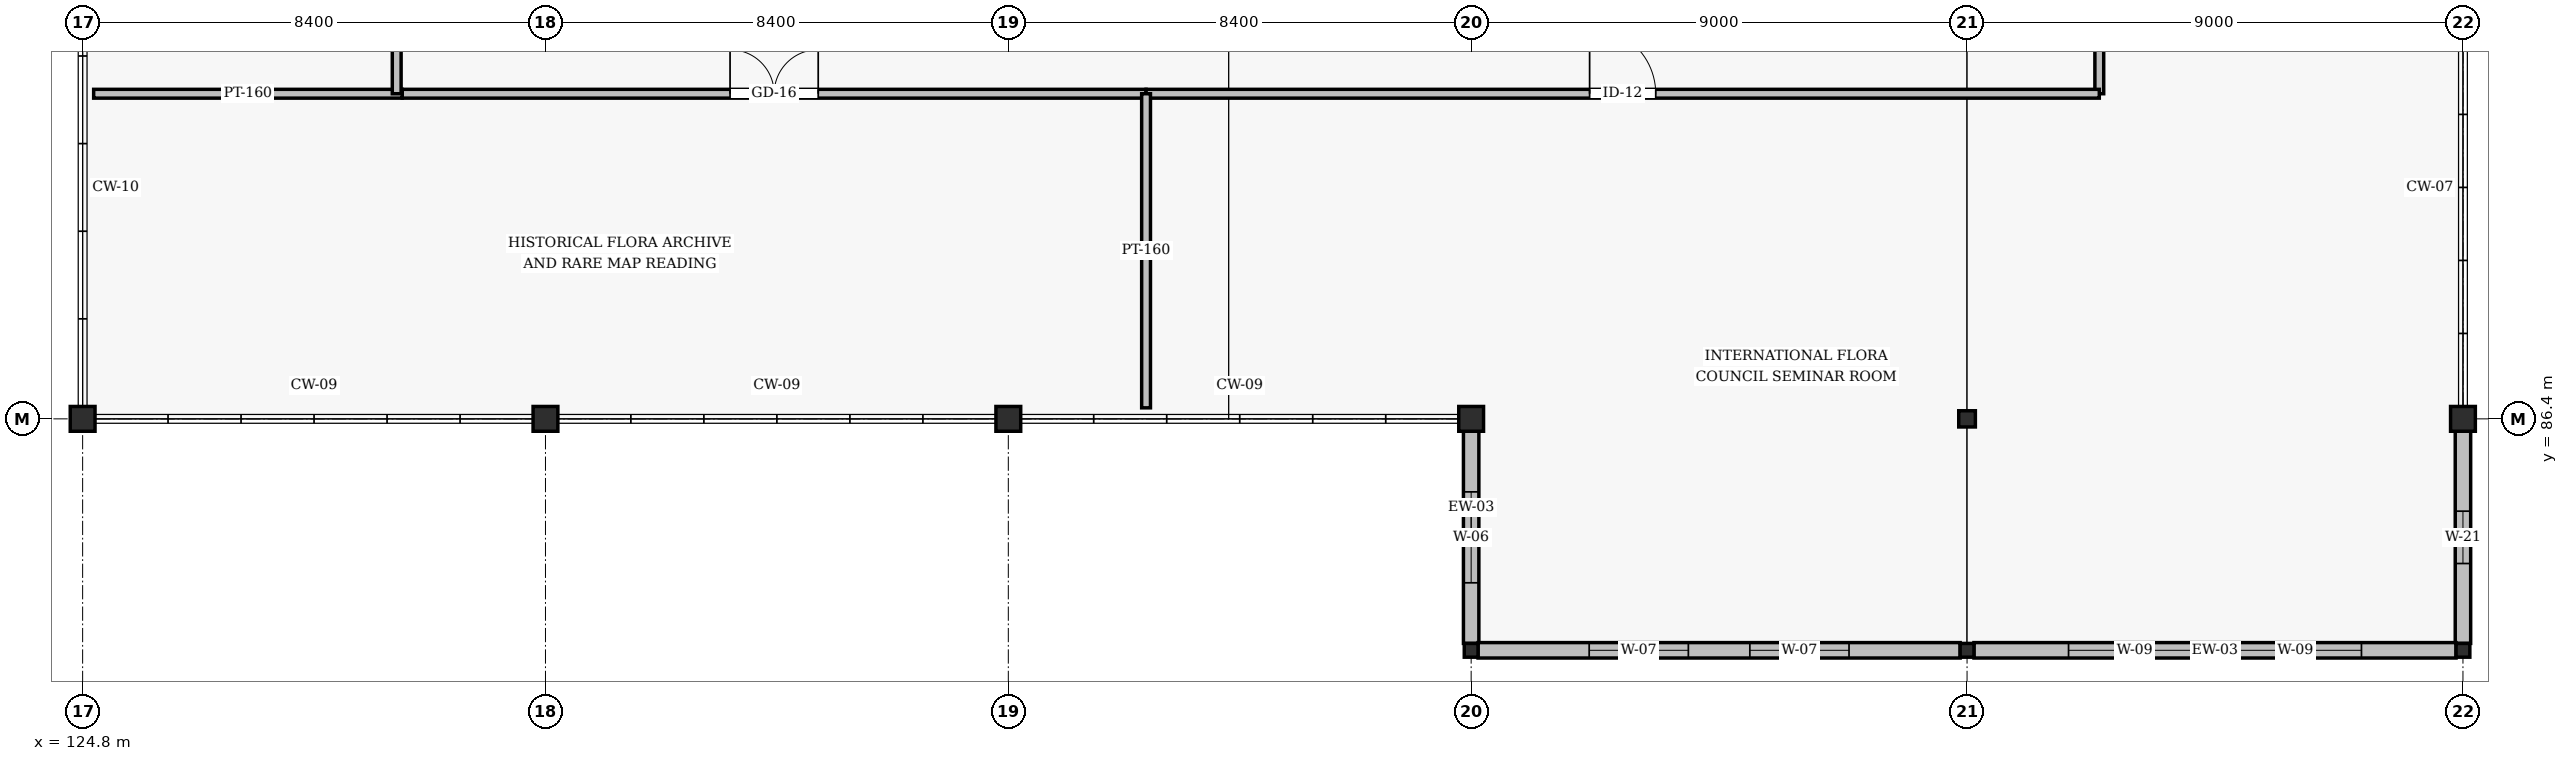
"""IFC4 building model, lengths in metres.
Left out: names, types, materials, properties, quantities, classifications, styles, units other than length and angle.
Written with IfcOpenShell. Run it as: python <this file> out.ifc"""

import sys

from ifc_helpers import new_model, si_unit, direction, frame, frame_2d, origin, origin_2d, place, context, subcontext, project, spatial, rectangle, hollow_rectangle, i_section, extrude, element, fill, save


model = new_model("IFC4")
c1 = context("Model", 3, precision=1e-05, world=origin(), true_north=direction((0.0, 1.0)))
c2 = subcontext(c1, "Body", "Model", "MODEL_VIEW")
j1 = project(units=[si_unit("LENGTHUNIT", "METRE"), si_unit("PLANEANGLEUNIT", "RADIAN")], contexts=[c1])
p1 = place(None, origin())
s1 = spatial("IfcSite", under=j1, at=p1, CompositionType="ELEMENT")
p2 = place(p1, origin())
s2 = spatial("IfcBuilding", under=s1, at=p2, CompositionType="ELEMENT")
p3 = place(p2, frame((0.0, 0.0, 46.8)))
s3 = spatial("IfcBuildingStorey", under=s2, at=p3, CompositionType="ELEMENT", Elevation=46.8)
p4 = place(p3, frame((124.8, 86.4, 0.0), z_axis=(0.0, 0.0, 1.0), x_axis=(1.0, 0.0, 0.0)))
e1 = element("IfcColumn", 1, at=p4, inside=s3, PredefinedType="COLUMN", context=c2, shape_type="SweptSolid", body=[
    extrude(hollow_rectangle(XDim=0.45, YDim=0.45, WallThickness=0.018, InnerFilletRadius=0.018, OuterFilletRadius=0.036, at=origin_2d()), origin(), (0.0, 0.0, 1.0), 3.576),
])
for number, where, z_axis, x_axis in (
    (2, (133.2, 86.4, 0.0), (0.0, 0.0, 1.0), (1.0, 0.0, 0.0)),
    (3, (141.6, 86.4, 0.0), (0.0, 0.0, 1.0), (1.0, 0.0, 0.0)),
):
    element("IfcColumn", number, at=place(p3, frame(where, z_axis=z_axis, x_axis=x_axis)), inside=s3, PredefinedType="COLUMN", context=c2, shape_type="SweptSolid", body=[
        extrude(hollow_rectangle(XDim=0.45, YDim=0.45, WallThickness=0.018, InnerFilletRadius=0.018, OuterFilletRadius=0.036, at=origin_2d()), origin(), (0.0, 0.0, 1.0), 3.6),
    ])
p5 = place(p3, frame((150.0, 82.2, 0.0), z_axis=(0.0, 0.0, 1.0), x_axis=(1.0, 0.0, 0.0)))
e4 = element("IfcColumn", 4, at=p5, inside=s3, PredefinedType="COLUMN", context=c2, shape_type="SweptSolid", body=[
    extrude(i_section(OverallWidth=0.25, OverallDepth=0.25, WebThickness=0.009, FlangeThickness=0.014, FilletRadius=0.016, at=origin_2d()), origin(), (0.0, 0.0, 1.0), 3.6),
])
p6 = place(p3, frame((150.0, 86.4, 0.0), z_axis=(0.0, 0.0, 1.0), x_axis=(1.0, 0.0, 0.0)))
e5 = element("IfcColumn", 5, at=p6, inside=s3, PredefinedType="COLUMN", context=c2, shape_type="SweptSolid", body=[
    extrude(hollow_rectangle(XDim=0.45, YDim=0.45, WallThickness=0.018, InnerFilletRadius=0.018, OuterFilletRadius=0.036, at=origin_2d()), origin(), (0.0, 0.0, 1.0), 3.6),
])
p7 = place(p3, frame((159.0, 82.2, 0.0), z_axis=(0.0, 0.0, 1.0), x_axis=(1.0, 0.0, 0.0)))
e6 = element("IfcColumn", 6, at=p7, inside=s3, PredefinedType="COLUMN", context=c2, shape_type="SweptSolid", body=[
    extrude(i_section(OverallWidth=0.25, OverallDepth=0.25, WebThickness=0.009, FlangeThickness=0.014, FilletRadius=0.016, at=origin_2d()), origin(), (0.0, 0.0, 1.0), 3.6),
])
p8 = place(p3, frame((159.0, 86.4, 0.0), z_axis=(0.0, 0.0, 1.0), x_axis=(1.0, 0.0, 0.0)))
e7 = element("IfcColumn", 7, at=p8, inside=s3, PredefinedType="COLUMN", context=c2, shape_type="SweptSolid", body=[
    extrude(i_section(OverallWidth=0.302, OverallDepth=0.294, WebThickness=0.012, FlangeThickness=0.012, FilletRadius=0.018, at=origin_2d()), origin(), (0.0, 0.0, 1.0), 3.6),
])
p9 = place(p3, frame((168.0, 82.2, 0.0), z_axis=(0.0, 0.0, 1.0), x_axis=(1.0, 0.0, 0.0)))
e8 = element("IfcColumn", 8, at=p9, inside=s3, PredefinedType="COLUMN", context=c2, shape_type="SweptSolid", body=[
    extrude(i_section(OverallWidth=0.25, OverallDepth=0.25, WebThickness=0.009, FlangeThickness=0.014, FilletRadius=0.016, at=origin_2d()), origin(), (0.0, 0.0, 1.0), 3.6),
])
p10 = place(p3, frame((168.0, 86.4, 0.0), z_axis=(0.0, 0.0, 1.0), x_axis=(1.0, 0.0, 0.0)))
e9 = element("IfcColumn", 9, at=p10, inside=s3, PredefinedType="COLUMN", context=c2, shape_type="SweptSolid", body=[
    extrude(hollow_rectangle(XDim=0.45, YDim=0.45, WallThickness=0.018, InnerFilletRadius=0.018, OuterFilletRadius=0.036, at=origin_2d()), origin(), (0.0, 0.0, 1.0), 3.6),
])
p11 = place(p3, frame((168.0, 82.325, 0.0), z_axis=(0.0, 0.0, 1.0), x_axis=(0.0, 1.0, 0.0)))
e10 = element("IfcWall", 10, at=p11, inside=s3, PredefinedType="SOLIDWALL", context=c2, shape_type="SweptSolid", body=[
    extrude(rectangle(XDim=3.85, YDim=0.28, at=frame_2d((1.925, 0.0))), origin(), (0.0, 0.0, 1.0), 3.338),
])
p12 = place(p11, frame((1.45, 0.0, 0.95)))
e11 = element("IfcOpeningElement", 11, at=p12, cuts=e10, PredefinedType="OPENING", context=c2, shape_type="SweptSolid", body=[
    extrude(rectangle(XDim=0.95, YDim=1.75, at=frame_2d((0.475, 0.875))), frame((0.0, 0.15, 0.0), z_axis=(0.0, -1.0, 0.0), x_axis=(1.0, 0.0, 0.0)), (0.0, 0.0, 1.0), 0.3),
])
p13 = place(p3, frame((150.0, 86.175, 0.0), z_axis=(0.0, 0.0, 1.0), x_axis=(0.0, -1.0, 0.0)))
e12 = element("IfcWall", 12, at=p13, inside=s3, PredefinedType="SOLIDWALL", context=c2, shape_type="SweptSolid", body=[
    extrude(rectangle(XDim=3.85, YDim=0.28, at=frame_2d((1.925, 0.0))), origin(), (0.0, 0.0, 1.0), 3.338),
])
p14 = place(p13, frame((1.1, 0.0, 0.85)))
e13 = element("IfcOpeningElement", 13, at=p14, cuts=e12, PredefinedType="OPENING", context=c2, shape_type="SweptSolid", body=[
    extrude(rectangle(XDim=1.65, YDim=2.1, at=frame_2d((0.825, 1.05))), frame((0.0, 0.15, 0.0), z_axis=(0.0, -1.0, 0.0), x_axis=(1.0, 0.0, 0.0)), (0.0, 0.0, 1.0), 0.3),
])
p15 = place(p3, frame((150.125, 82.2, 0.0), z_axis=(0.0, 0.0, 1.0), x_axis=(1.0, 0.0, 0.0)))
e14 = element("IfcWall", 14, at=p15, inside=s3, PredefinedType="SOLIDWALL", context=c2, shape_type="SweptSolid", body=[
    extrude(rectangle(XDim=8.75, YDim=0.28, at=frame_2d((4.375, 0.0))), origin(), (0.0, 0.0, 1.0), 3.338),
])
p16 = place(p15, frame((2.017, 0.0, 0.85)))
e15 = element("IfcOpeningElement", 15, at=p16, cuts=e14, PredefinedType="OPENING", context=c2, shape_type="SweptSolid", body=[
    extrude(rectangle(XDim=1.8, YDim=2.1, at=frame_2d((0.9, 1.05))), frame((0.0, 0.15, 0.0), z_axis=(0.0, -1.0, 0.0), x_axis=(1.0, 0.0, 0.0)), (0.0, 0.0, 1.0), 0.3),
])
p17 = place(p15, frame((4.933, 0.0, 0.85)))
e16 = element("IfcOpeningElement", 16, at=p17, cuts=e14, PredefinedType="OPENING", context=c2, shape_type="SweptSolid", body=[
    extrude(rectangle(XDim=1.8, YDim=2.1, at=frame_2d((0.9, 1.05))), frame((0.0, 0.15, 0.0), z_axis=(0.0, -1.0, 0.0), x_axis=(1.0, 0.0, 0.0)), (0.0, 0.0, 1.0), 0.3),
])
p18 = place(p3, frame((159.125, 82.2, 0.0), z_axis=(0.0, 0.0, 1.0), x_axis=(1.0, 0.0, 0.0)))
e17 = element("IfcWall", 17, at=p18, inside=s3, PredefinedType="SOLIDWALL", context=c2, shape_type="SweptSolid", body=[
    extrude(rectangle(XDim=8.75, YDim=0.28, at=frame_2d((4.375, 0.0))), origin(), (0.0, 0.0, 1.0), 3.338),
])
p19 = place(p18, frame((1.717, 0.0, 0.85)))
e18 = element("IfcOpeningElement", 18, at=p19, cuts=e17, PredefinedType="OPENING", context=c2, shape_type="SweptSolid", body=[
    extrude(rectangle(XDim=2.4, YDim=2.1, at=frame_2d((1.2, 1.05))), frame((0.0, 0.15, 0.0), z_axis=(0.0, -1.0, 0.0), x_axis=(1.0, 0.0, 0.0)), (0.0, 0.0, 1.0), 0.3),
])
p20 = place(p18, frame((4.633, 0.0, 0.85)))
e19 = element("IfcOpeningElement", 19, at=p20, cuts=e17, PredefinedType="OPENING", context=c2, shape_type="SweptSolid", body=[
    extrude(rectangle(XDim=2.4, YDim=2.1, at=frame_2d((1.2, 1.05))), frame((0.0, 0.15, 0.0), z_axis=(0.0, -1.0, 0.0), x_axis=(1.0, 0.0, 0.0)), (0.0, 0.0, 1.0), 0.3),
])
p21 = place(p3, frame((161.4, 92.3, 0.0), z_axis=(0.0, 0.0, 1.0), x_axis=(0.0, 1.0, 0.0)))
e20 = element("IfcWall", 20, at=p21, inside=s3, PredefinedType="PARTITIONING", context=c2, shape_type="SweptSolid", body=[
    extrude(rectangle(XDim=14.1, YDim=0.16, at=frame_2d((7.05, 0.0))), origin(), (0.0, 0.0, 1.0), 2.742),
])
p22 = place(p21, frame((6.5, 0.0, 0.0)))
e21 = element("IfcOpeningElement", 21, at=p22, cuts=e20, PredefinedType="OPENING", context=c2, shape_type="SweptSolid", body=[
    extrude(rectangle(XDim=1.08, YDim=2.08, at=frame_2d((0.54, 1.04))), frame((0.0, 0.09, 0.0), z_axis=(0.0, -1.0, 0.0), x_axis=(1.0, 0.0, 0.0)), (0.0, 0.0, 1.0), 0.18),
])
p23 = place(p3, frame((130.6, 92.3, 0.0), z_axis=(0.0, 0.0, 1.0), x_axis=(1.0, 0.0, 0.0)))
e22 = element("IfcWall", 22, at=p23, inside=s3, PredefinedType="PARTITIONING", context=c2, shape_type="SweptSolid", body=[
    extrude(rectangle(XDim=13.5, YDim=0.16, at=frame_2d((6.75, 0.0))), origin(), (0.0, 0.0, 1.0), 2.838),
])
p24 = place(p23, frame((5.95, 0.0, 0.0)))
e23 = element("IfcOpeningElement", 23, at=p24, cuts=e22, PredefinedType="OPENING", context=c2, shape_type="SweptSolid", body=[
    extrude(rectangle(XDim=1.6, YDim=2.1, at=frame_2d((0.8, 1.05))), frame((0.0, 0.09, 0.0), z_axis=(0.0, -1.0, 0.0), x_axis=(1.0, 0.0, 0.0)), (0.0, 0.0, 1.0), 0.18),
])
p25 = place(p3, frame((144.1, 92.3, 0.0), z_axis=(0.0, 0.0, 1.0), x_axis=(1.0, 0.0, 0.0)))
e24 = element("IfcWall", 24, at=p25, inside=s3, PredefinedType="PARTITIONING", context=c2, shape_type="SweptSolid", body=[
    extrude(rectangle(XDim=17.3, YDim=0.16, at=frame_2d((8.65, 0.0))), origin(), (0.0, 0.0, 1.0), 2.838),
])
p26 = place(p25, frame((8.05, 0.0, 0.0)))
e25 = element("IfcOpeningElement", 25, at=p26, cuts=e24, PredefinedType="OPENING", context=c2, shape_type="SweptSolid", body=[
    extrude(rectangle(XDim=1.2, YDim=2.08, at=frame_2d((0.6, 1.04))), frame((0.0, 0.09, 0.0), z_axis=(0.0, -1.0, 0.0), x_axis=(1.0, 0.0, 0.0)), (0.0, 0.0, 1.0), 0.18),
])
p27 = place(p3, frame((125.0, 92.3, 0.0), z_axis=(0.0, 0.0, 1.0), x_axis=(1.0, 0.0, 0.0)))
e26 = element("IfcWall", 26, at=p27, inside=s3, PredefinedType="PARTITIONING", context=c2, shape_type="SweptSolid", body=[
    extrude(rectangle(XDim=5.6, YDim=0.16, at=frame_2d((2.8, 0.0))), origin(), (0.0, 0.0, 1.0), 3.338),
])
p28 = place(p3, frame((144.1, 86.6, 0.0), z_axis=(0.0, 0.0, 1.0), x_axis=(0.0, 1.0, 0.0)))
e27 = element("IfcWall", 27, at=p28, inside=s3, PredefinedType="PARTITIONING", context=c2, shape_type="SweptSolid", body=[
    extrude(rectangle(XDim=5.7, YDim=0.16, at=frame_2d((2.85, 0.0))), origin(), (0.0, 0.0, 1.0), 2.988),
])
p29 = place(p3, frame((130.5, 92.3, 0.0), z_axis=(0.0, 0.0, 1.0), x_axis=(0.0, 1.0, 0.0)))
e28 = element("IfcWall", 28, at=p29, inside=s3, PredefinedType="PARTITIONING", context=c2, shape_type="SweptSolid", body=[
    extrude(rectangle(XDim=14.2, YDim=0.16, at=frame_2d((7.1, 0.0))), origin(), (0.0, 0.0, 1.0), 2.838),
])
p30 = place(p29, frame((6.5, 0.0, 0.0)))
e29 = element("IfcOpeningElement", 29, at=p30, cuts=e28, PredefinedType="OPENING", context=c2, shape_type="SweptSolid", body=[
    extrude(rectangle(XDim=1.25, YDim=2.12, at=frame_2d((0.625, 1.06))), frame((0.0, 0.09, 0.0), z_axis=(0.0, -1.0, 0.0), x_axis=(1.0, 0.0, 0.0)), (0.0, 0.0, 1.0), 0.18),
])
p31 = place(p12, origin())
e30 = element("IfcWindow", 30, at=p31, inside=s3, PartitioningType="SINGLE_PANEL", PredefinedType="WINDOW", context=c2, shape_type="SweptSolid", body=[
    extrude(rectangle(XDim=0.95, YDim=1.75, at=frame_2d((0.475, 0.875))), frame((0.0, 0.03, 0.0), z_axis=(0.0, -1.0, 0.0), x_axis=(1.0, 0.0, 0.0)), (0.0, 0.0, 1.0), 0.06),
])
fill(e11, e30)
p32 = place(p14, origin())
e31 = element("IfcWindow", 31, at=p32, inside=s3, PartitioningType="SINGLE_PANEL", PredefinedType="WINDOW", context=c2, shape_type="SweptSolid", body=[
    extrude(rectangle(XDim=1.65, YDim=2.1, at=frame_2d((0.825, 1.05))), frame((0.0, 0.03, 0.0), z_axis=(0.0, -1.0, 0.0), x_axis=(1.0, 0.0, 0.0)), (0.0, 0.0, 1.0), 0.06),
])
fill(e13, e31)
p33 = place(p16, origin())
e32 = element("IfcWindow", 32, at=p33, inside=s3, PartitioningType="SINGLE_PANEL", PredefinedType="WINDOW", context=c2, shape_type="SweptSolid", body=[
    extrude(rectangle(XDim=1.8, YDim=2.1, at=frame_2d((0.9, 1.05))), frame((0.0, 0.03, 0.0), z_axis=(0.0, -1.0, 0.0), x_axis=(1.0, 0.0, 0.0)), (0.0, 0.0, 1.0), 0.06),
])
fill(e15, e32)
p34 = place(p17, origin())
e33 = element("IfcWindow", 33, at=p34, inside=s3, PartitioningType="SINGLE_PANEL", PredefinedType="WINDOW", context=c2, shape_type="SweptSolid", body=[
    extrude(rectangle(XDim=1.8, YDim=2.1, at=frame_2d((0.9, 1.05))), frame((0.0, 0.03, 0.0), z_axis=(0.0, -1.0, 0.0), x_axis=(1.0, 0.0, 0.0)), (0.0, 0.0, 1.0), 0.06),
])
fill(e16, e33)
p35 = place(p19, origin())
e34 = element("IfcWindow", 34, at=p35, inside=s3, PartitioningType="SINGLE_PANEL", PredefinedType="WINDOW", context=c2, shape_type="SweptSolid", body=[
    extrude(rectangle(XDim=2.4, YDim=2.1, at=frame_2d((1.2, 1.05))), frame((0.0, 0.03, 0.0), z_axis=(0.0, -1.0, 0.0), x_axis=(1.0, 0.0, 0.0)), (0.0, 0.0, 1.0), 0.06),
])
fill(e18, e34)
p36 = place(p20, origin())
e35 = element("IfcWindow", 35, at=p36, inside=s3, PartitioningType="SINGLE_PANEL", PredefinedType="WINDOW", context=c2, shape_type="SweptSolid", body=[
    extrude(rectangle(XDim=2.4, YDim=2.1, at=frame_2d((1.2, 1.05))), frame((0.0, 0.03, 0.0), z_axis=(0.0, -1.0, 0.0), x_axis=(1.0, 0.0, 0.0)), (0.0, 0.0, 1.0), 0.06),
])
fill(e19, e35)
p37 = place(p24, origin())
e36 = element("IfcDoor", 36, at=p37, inside=s3, OperationType="DOUBLE_DOOR_SINGLE_SWING", PredefinedType="DOOR", context=c2, shape_type="SweptSolid", body=[
    extrude(rectangle(XDim=1.6, YDim=2.1, at=frame_2d((0.8, 1.05))), frame((0.0, 0.025, 0.0), z_axis=(0.0, -1.0, 0.0), x_axis=(1.0, 0.0, 0.0)), (0.0, 0.0, 1.0), 0.05),
])
fill(e23, e36)
p38 = place(p26, origin())
e37 = element("IfcDoor", 37, at=p38, inside=s3, OperationType="SINGLE_SWING_LEFT", PredefinedType="DOOR", context=c2, shape_type="SweptSolid", body=[
    extrude(rectangle(XDim=1.2, YDim=2.08, at=frame_2d((0.6, 1.04))), frame((0.0, 0.025, 0.0), z_axis=(0.0, -1.0, 0.0), x_axis=(1.0, 0.0, 0.0)), (0.0, 0.0, 1.0), 0.05),
])
fill(e25, e37)
save(model, sys.argv[1])
